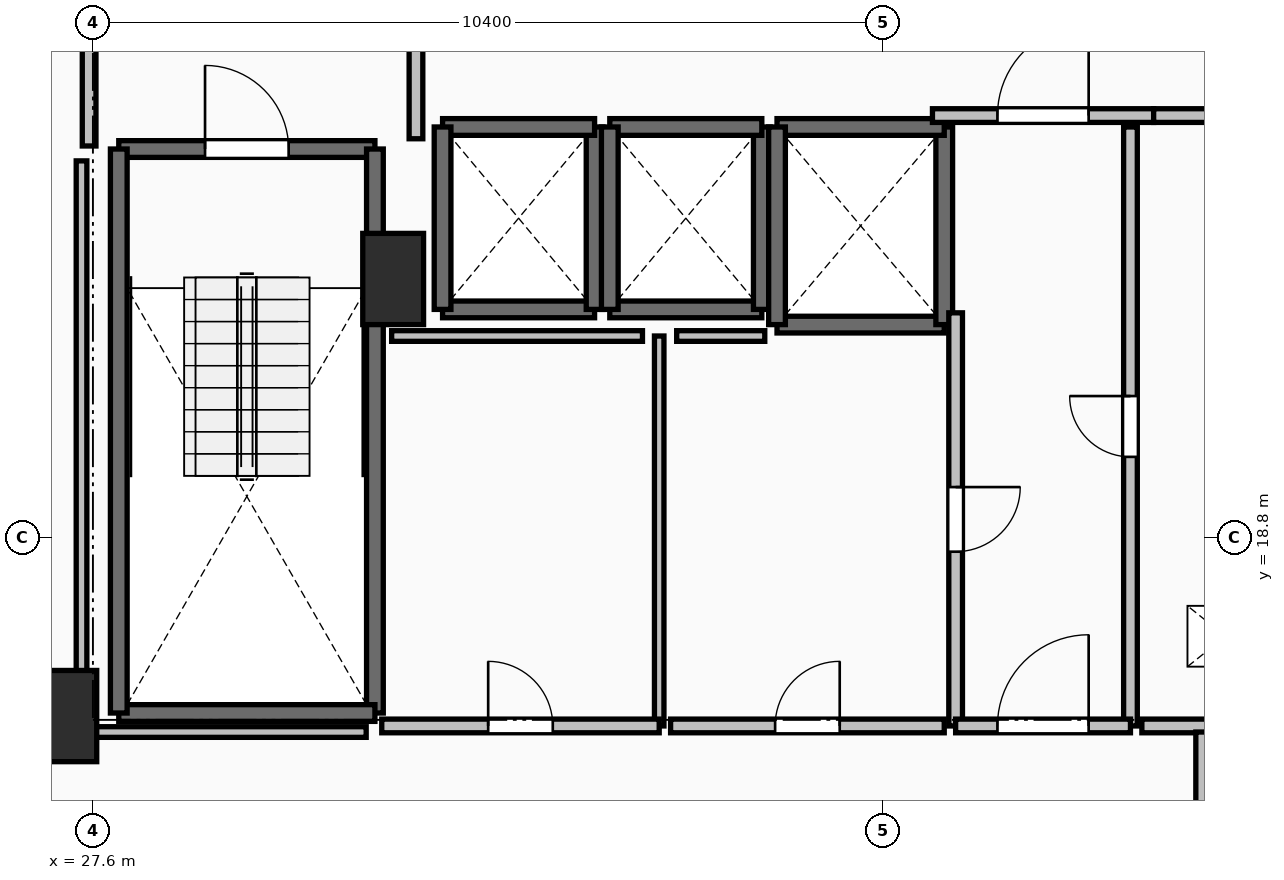
"""IFC4 building model, lengths in metres.
Left out: names, types, materials, properties, quantities, classifications, styles, units other than length and angle.
Written with IfcOpenShell. Run it as: python <this file> out.ifc"""

import sys

from ifc_helpers import new_model, si_unit, direction, frame, frame_2d, origin, origin_2d, place, context, subcontext, project, spatial, rectangle, extrude, element, fill, save


model = new_model("IFC4")
c1 = context("Model", 3, precision=1e-05, world=origin(), true_north=direction((0.0, 1.0)))
c2 = subcontext(c1, "Body", "Model", "MODEL_VIEW")
j1 = project(units=[si_unit("LENGTHUNIT", "METRE"), si_unit("PLANEANGLEUNIT", "RADIAN")], contexts=[c1])
p1 = place(None, origin())
s1 = spatial("IfcSite", under=j1, at=p1, CompositionType="ELEMENT")
p2 = place(p1, origin())
s2 = spatial("IfcBuilding", under=s1, at=p2, CompositionType="ELEMENT")
p3 = place(p2, frame((0.0, 0.0, 59.0)))
s3 = spatial("IfcBuildingStorey", under=s2, at=p3, CompositionType="ELEMENT", Elevation=59.0)
for number, where, z_axis, x_axis in (
    (1, (27.25, 16.45, 0.0), (0.0, 0.0, 1.0), (1.0, 0.0, 0.0)),
    (2, (31.55, 22.2, 0.0), (0.0, 0.0, 1.0), (1.0, 0.0, 0.0)),
):
    element("IfcColumn", number, at=place(p3, frame(where, z_axis=z_axis, x_axis=x_axis)), inside=s3, PredefinedType="PILASTER", context=c2, shape_type="SweptSolid", body=[
        extrude(rectangle(XDim=0.8, YDim=1.2, at=origin_2d()), origin(), (0.0, 0.0, 1.0), 3.5),
    ])
p4 = place(p3, frame((27.94, 23.91, 0.0), z_axis=(0.0, 0.0, 1.0), x_axis=(1.0, 0.0, 0.0)))
e3 = element("IfcWall", 3, at=p4, inside=s3, PredefinedType="SOLIDWALL", context=c2, shape_type="SweptSolid", body=[
    extrude(rectangle(XDim=3.37, YDim=0.22, at=frame_2d((1.685, 0.0))), origin(), (0.0, 0.0, 1.0), 3.24),
])
p5 = place(p4, frame((1.135, 0.0, 0.0)))
e4 = element("IfcOpeningElement", 4, at=p5, cuts=e3, PredefinedType="OPENING", context=c2, shape_type="SweptSolid", body=[
    extrude(rectangle(XDim=1.1, YDim=2.15, at=frame_2d((0.55, 1.075))), frame((0.0, 0.125, 0.0), z_axis=(0.0, -1.0, 0.0), x_axis=(1.0, 0.0, 0.0)), (0.0, 0.0, 1.0), 0.25),
])
p6 = place(p3, frame((31.31, 23.91, 0.0), z_axis=(0.0, 0.0, 1.0), x_axis=(0.0, -1.0, 0.0)))
e5 = element("IfcWall", 5, at=p6, inside=s3, PredefinedType="SOLIDWALL", context=c2, shape_type="SweptSolid", body=[
    extrude(rectangle(XDim=7.42, YDim=0.22, at=frame_2d((3.71, 0.0))), origin(), (0.0, 0.0, 1.0), 3.24),
])
p7 = place(p3, frame((31.31, 16.49, 0.0), z_axis=(0.0, 0.0, 1.0), x_axis=(-1.0, 0.0, 0.0)))
e6 = element("IfcWall", 6, at=p7, inside=s3, PredefinedType="SOLIDWALL", context=c2, shape_type="SweptSolid", body=[
    extrude(rectangle(XDim=3.37, YDim=0.22, at=frame_2d((1.685, 0.0))), origin(), (0.0, 0.0, 1.0), 3.24),
])
p8 = place(p3, frame((27.94, 16.49, 0.0), z_axis=(0.0, 0.0, 1.0), x_axis=(0.0, 1.0, 0.0)))
e7 = element("IfcWall", 7, at=p8, inside=s3, PredefinedType="SOLIDWALL", context=c2, shape_type="SweptSolid", body=[
    extrude(rectangle(XDim=7.42, YDim=0.22, at=frame_2d((3.71, 0.0))), origin(), (0.0, 0.0, 1.0), 3.24),
])
p9 = place(p3, frame((32.2, 21.8, 0.0), z_axis=(0.0, 0.0, 1.0), x_axis=(1.0, 0.0, 0.0)))
e8 = element("IfcWall", 8, at=p9, inside=s3, PredefinedType="SOLIDWALL", context=c2, shape_type="SweptSolid", body=[
    extrude(rectangle(XDim=2.0, YDim=0.22, at=frame_2d((1.0, 0.0))), origin(), (0.0, 0.0, 1.0), 3.24),
])
p10 = place(p3, frame((34.2, 21.8, 0.0), z_axis=(0.0, 0.0, 1.0), x_axis=(0.0, 1.0, 0.0)))
e9 = element("IfcWall", 9, at=p10, inside=s3, PredefinedType="SOLIDWALL", context=c2, shape_type="SweptSolid", body=[
    extrude(rectangle(XDim=2.4, YDim=0.22, at=frame_2d((1.2, 0.0))), origin(), (0.0, 0.0, 1.0), 3.24),
])
p11 = place(p3, frame((34.2, 24.2, 0.0), z_axis=(0.0, 0.0, 1.0), x_axis=(-1.0, 0.0, 0.0)))
e10 = element("IfcWall", 10, at=p11, inside=s3, PredefinedType="SOLIDWALL", context=c2, shape_type="SweptSolid", body=[
    extrude(rectangle(XDim=2.0, YDim=0.22, at=frame_2d((1.0, 0.0))), origin(), (0.0, 0.0, 1.0), 3.24),
])
p12 = place(p3, frame((32.2, 24.2, 0.0), z_axis=(0.0, 0.0, 1.0), x_axis=(0.0, -1.0, 0.0)))
e11 = element("IfcWall", 11, at=p12, inside=s3, PredefinedType="SOLIDWALL", context=c2, shape_type="SweptSolid", body=[
    extrude(rectangle(XDim=2.4, YDim=0.22, at=frame_2d((1.2, 0.0))), origin(), (0.0, 0.0, 1.0), 3.24),
])
p13 = place(p3, frame((34.4, 21.8, 0.0), z_axis=(0.0, 0.0, 1.0), x_axis=(1.0, 0.0, 0.0)))
e12 = element("IfcWall", 12, at=p13, inside=s3, PredefinedType="SOLIDWALL", context=c2, shape_type="SweptSolid", body=[
    extrude(rectangle(XDim=2.0, YDim=0.22, at=frame_2d((1.0, 0.0))), origin(), (0.0, 0.0, 1.0), 3.24),
])
p14 = place(p3, frame((36.4, 21.8, 0.0), z_axis=(0.0, 0.0, 1.0), x_axis=(0.0, 1.0, 0.0)))
e13 = element("IfcWall", 13, at=p14, inside=s3, PredefinedType="SOLIDWALL", context=c2, shape_type="SweptSolid", body=[
    extrude(rectangle(XDim=2.4, YDim=0.22, at=frame_2d((1.2, 0.0))), origin(), (0.0, 0.0, 1.0), 3.24),
])
p15 = place(p3, frame((36.4, 24.2, 0.0), z_axis=(0.0, 0.0, 1.0), x_axis=(-1.0, 0.0, 0.0)))
e14 = element("IfcWall", 14, at=p15, inside=s3, PredefinedType="SOLIDWALL", context=c2, shape_type="SweptSolid", body=[
    extrude(rectangle(XDim=2.0, YDim=0.22, at=frame_2d((1.0, 0.0))), origin(), (0.0, 0.0, 1.0), 3.24),
])
p16 = place(p3, frame((34.4, 24.2, 0.0), z_axis=(0.0, 0.0, 1.0), x_axis=(0.0, -1.0, 0.0)))
e15 = element("IfcWall", 15, at=p16, inside=s3, PredefinedType="SOLIDWALL", context=c2, shape_type="SweptSolid", body=[
    extrude(rectangle(XDim=2.4, YDim=0.22, at=frame_2d((1.2, 0.0))), origin(), (0.0, 0.0, 1.0), 3.24),
])
p17 = place(p3, frame((36.6, 21.6, 0.0), z_axis=(0.0, 0.0, 1.0), x_axis=(1.0, 0.0, 0.0)))
e16 = element("IfcWall", 16, at=p17, inside=s3, PredefinedType="SOLIDWALL", context=c2, shape_type="SweptSolid", body=[
    extrude(rectangle(XDim=2.2, YDim=0.22, at=frame_2d((1.1, 0.0))), origin(), (0.0, 0.0, 1.0), 3.24),
])
p18 = place(p3, frame((38.8, 21.6, 0.0), z_axis=(0.0, 0.0, 1.0), x_axis=(0.0, 1.0, 0.0)))
e17 = element("IfcWall", 17, at=p18, inside=s3, PredefinedType="SOLIDWALL", context=c2, shape_type="SweptSolid", body=[
    extrude(rectangle(XDim=2.6, YDim=0.22, at=frame_2d((1.3, 0.0))), origin(), (0.0, 0.0, 1.0), 3.24),
])
p19 = place(p3, frame((38.8, 24.2, 0.0), z_axis=(0.0, 0.0, 1.0), x_axis=(-1.0, 0.0, 0.0)))
e18 = element("IfcWall", 18, at=p19, inside=s3, PredefinedType="SOLIDWALL", context=c2, shape_type="SweptSolid", body=[
    extrude(rectangle(XDim=2.2, YDim=0.22, at=frame_2d((1.1, 0.0))), origin(), (0.0, 0.0, 1.0), 3.24),
])
p20 = place(p3, frame((36.6, 24.2, 0.0), z_axis=(0.0, 0.0, 1.0), x_axis=(0.0, -1.0, 0.0)))
e19 = element("IfcWall", 19, at=p20, inside=s3, PredefinedType="SOLIDWALL", context=c2, shape_type="SweptSolid", body=[
    extrude(rectangle(XDim=2.6, YDim=0.22, at=frame_2d((1.3, 0.0))), origin(), (0.0, 0.0, 1.0), 3.24),
])
p21 = place(p3, frame((31.85, 24.045, 0.0), z_axis=(0.0, 0.0, 1.0), x_axis=(0.0, 1.0, 0.0)))
e20 = element("IfcWall", 20, at=p21, inside=s3, PredefinedType="PARTITIONING", context=c2, shape_type="SweptSolid", body=[
    extrude(rectangle(XDim=3.91, YDim=0.18, at=frame_2d((1.955, 0.0))), origin(), (0.0, 0.0, 1.0), 3.24),
])
p22 = place(p21, frame((1.355, 0.0, 0.0)))
e21 = element("IfcOpeningElement", 21, at=p22, cuts=e20, PredefinedType="OPENING", context=c2, shape_type="SweptSolid", body=[
    extrude(rectangle(XDim=1.2, YDim=2.15, at=frame_2d((0.6, 1.075))), frame((0.0, 0.105, 0.0), z_axis=(0.0, -1.0, 0.0), x_axis=(1.0, 0.0, 0.0)), (0.0, 0.0, 1.0), 0.21),
])
p23 = place(p3, frame((27.55, 28.0, 0.0), z_axis=(0.0, 0.0, 1.0), x_axis=(0.0, -1.0, 0.0)))
e22 = element("IfcWall", 22, at=p23, inside=s3, PredefinedType="PARTITIONING", context=c2, shape_type="SweptSolid", body=[
    extrude(rectangle(XDim=4.05, YDim=0.18, at=frame_2d((2.025, 0.0))), origin(), (0.0, 0.0, 1.0), 3.24),
])
p24 = place(p23, frame((1.425, 0.0, 0.0)))
e23 = element("IfcOpeningElement", 23, at=p24, cuts=e22, PredefinedType="OPENING", context=c2, shape_type="SweptSolid", body=[
    extrude(rectangle(XDim=1.2, YDim=2.15, at=frame_2d((0.6, 1.075))), frame((0.0, 0.105, 0.0), z_axis=(0.0, -1.0, 0.0), x_axis=(1.0, 0.0, 0.0)), (0.0, 0.0, 1.0), 0.21),
])
p25 = place(p3, frame((38.645, 24.35, 0.0), z_axis=(0.0, 0.0, 1.0), x_axis=(1.0, 0.0, 0.0)))
e24 = element("IfcWall", 24, at=p25, inside=s3, PredefinedType="PARTITIONING", context=c2, shape_type="SweptSolid", body=[
    extrude(rectangle(XDim=2.91, YDim=0.18, at=frame_2d((1.455, 0.0))), origin(), (0.0, 0.0, 1.0), 3.24),
])
p26 = place(p25, frame((0.855, 0.0, 0.0)))
e25 = element("IfcOpeningElement", 25, at=p26, cuts=e24, PredefinedType="OPENING", context=c2, shape_type="SweptSolid", body=[
    extrude(rectangle(XDim=1.2, YDim=2.15, at=frame_2d((0.6, 1.075))), frame((0.0, 0.105, 0.0), z_axis=(0.0, -1.0, 0.0), x_axis=(1.0, 0.0, 0.0)), (0.0, 0.0, 1.0), 0.21),
])
p27 = place(p3, frame((41.555, 24.35, 0.0), z_axis=(0.0, 0.0, 1.0), x_axis=(1.0, 0.0, 0.0)))
e26 = element("IfcWall", 26, at=p27, inside=s3, PredefinedType="PARTITIONING", context=c2, shape_type="SweptSolid", body=[
    extrude(rectangle(XDim=2.445, YDim=0.18, at=frame_2d((1.223, 0.0))), origin(), (0.0, 0.0, 1.0), 3.24),
])
p28 = place(p27, frame((0.823, 0.0, 0.0)))
e27 = element("IfcOpeningElement", 27, at=p28, cuts=e26, PredefinedType="OPENING", context=c2, shape_type="SweptSolid", body=[
    extrude(rectangle(XDim=0.8, YDim=2.05, at=frame_2d((0.4, 1.025))), frame((0.0, 0.105, 0.0), z_axis=(0.0, -1.0, 0.0), x_axis=(1.0, 0.0, 0.0)), (0.0, 0.0, 1.0), 0.21),
])
p29 = place(p3, frame((41.25, 16.32, 0.0), z_axis=(0.0, 0.0, 1.0), x_axis=(0.0, 1.0, 0.0)))
e28 = element("IfcWall", 28, at=p29, inside=s3, PredefinedType="PARTITIONING", context=c2, shape_type="SweptSolid", body=[
    extrude(rectangle(XDim=7.88, YDim=0.18, at=frame_2d((3.94, 0.0))), origin(), (0.0, 0.0, 1.0), 3.24),
])
p30 = place(p29, frame((3.54, 0.0, 0.0)))
e29 = element("IfcOpeningElement", 29, at=p30, cuts=e28, PredefinedType="OPENING", context=c2, shape_type="SweptSolid", body=[
    extrude(rectangle(XDim=0.8, YDim=2.05, at=frame_2d((0.4, 1.025))), frame((0.0, 0.105, 0.0), z_axis=(0.0, -1.0, 0.0), x_axis=(1.0, 0.0, 0.0)), (0.0, 0.0, 1.0), 0.21),
])
p31 = place(p3, frame((38.95, 21.755, 0.0), z_axis=(0.0, 0.0, 1.0), x_axis=(0.0, -1.0, 0.0)))
e30 = element("IfcWall", 30, at=p31, inside=s3, PredefinedType="PARTITIONING", context=c2, shape_type="SweptSolid", body=[
    extrude(rectangle(XDim=5.435, YDim=0.18, at=frame_2d((2.717, 0.0))), origin(), (0.0, 0.0, 1.0), 3.24),
])
p32 = place(p31, frame((2.292, 0.0, 0.0)))
e31 = element("IfcOpeningElement", 31, at=p32, cuts=e30, PredefinedType="OPENING", context=c2, shape_type="SweptSolid", body=[
    extrude(rectangle(XDim=0.85, YDim=2.1, at=frame_2d((0.425, 1.05))), frame((0.0, 0.105, 0.0), z_axis=(0.0, -1.0, 0.0), x_axis=(1.0, 0.0, 0.0)), (0.0, 0.0, 1.0), 0.21),
])
p33 = place(p3, frame((38.95, 16.32, 0.0), z_axis=(0.0, 0.0, 1.0), x_axis=(1.0, 0.0, 0.0)))
e32 = element("IfcWall", 32, at=p33, inside=s3, PredefinedType="PARTITIONING", context=c2, shape_type="SweptSolid", body=[
    extrude(rectangle(XDim=2.3, YDim=0.18, at=frame_2d((1.15, 0.0))), origin(), (0.0, 0.0, 1.0), 3.24),
])
p34 = place(p33, frame((0.55, 0.0, 0.0)))
e33 = element("IfcOpeningElement", 33, at=p34, cuts=e32, PredefinedType="OPENING", context=c2, shape_type="SweptSolid", body=[
    extrude(rectangle(XDim=1.2, YDim=2.15, at=frame_2d((0.6, 1.075))), frame((0.0, 0.105, 0.0), z_axis=(0.0, -1.0, 0.0), x_axis=(1.0, 0.0, 0.0)), (0.0, 0.0, 1.0), 0.21),
])
p35 = place(p3, frame((41.4, 16.32, 0.0), z_axis=(0.0, 0.0, 1.0), x_axis=(1.0, 0.0, 0.0)))
e34 = element("IfcWall", 34, at=p35, inside=s3, PredefinedType="PARTITIONING", context=c2, shape_type="SweptSolid", body=[
    extrude(rectangle(XDim=3.2, YDim=0.18, at=frame_2d((1.6, 0.0))), origin(), (0.0, 0.0, 1.0), 3.24),
])
p36 = place(p35, frame((1.2, 0.0, 0.0)))
e35 = element("IfcOpeningElement", 35, at=p36, cuts=e34, PredefinedType="OPENING", context=c2, shape_type="SweptSolid", body=[
    extrude(rectangle(XDim=0.8, YDim=2.05, at=frame_2d((0.4, 1.025))), frame((0.0, 0.105, 0.0), z_axis=(0.0, -1.0, 0.0), x_axis=(1.0, 0.0, 0.0)), (0.0, 0.0, 1.0), 0.21),
])
p37 = place(p3, frame((35.05, 16.32, 0.0), z_axis=(0.0, 0.0, 1.0), x_axis=(0.0, 1.0, 0.0)))
e36 = element("IfcWall", 36, at=p37, inside=s3, PredefinedType="PARTITIONING", context=c2, shape_type="SweptSolid", body=[
    extrude(rectangle(XDim=5.13, YDim=0.125, at=frame_2d((2.565, 0.0))), origin(), (0.0, 0.0, 1.0), 3.24),
])
p38 = place(p3, frame((31.4, 16.32, 0.0), z_axis=(0.0, 0.0, 1.0), x_axis=(1.0, 0.0, 0.0)))
e37 = element("IfcWall", 37, at=p38, inside=s3, PredefinedType="PARTITIONING", context=c2, shape_type="SweptSolid", body=[
    extrude(rectangle(XDim=3.65, YDim=0.18, at=frame_2d((1.825, 0.0))), origin(), (0.0, 0.0, 1.0), 3.24),
])
p39 = place(p38, frame((1.4, 0.0, 0.0)))
e38 = element("IfcOpeningElement", 38, at=p39, cuts=e37, PredefinedType="OPENING", context=c2, shape_type="SweptSolid", body=[
    extrude(rectangle(XDim=0.85, YDim=2.1, at=frame_2d((0.425, 1.05))), frame((0.0, 0.105, 0.0), z_axis=(0.0, -1.0, 0.0), x_axis=(1.0, 0.0, 0.0)), (0.0, 0.0, 1.0), 0.21),
])
p40 = place(p3, frame((35.2, 16.32, 0.0), z_axis=(0.0, 0.0, 1.0), x_axis=(1.0, 0.0, 0.0)))
e39 = element("IfcWall", 39, at=p40, inside=s3, PredefinedType="PARTITIONING", context=c2, shape_type="SweptSolid", body=[
    extrude(rectangle(XDim=3.6, YDim=0.18, at=frame_2d((1.8, 0.0))), origin(), (0.0, 0.0, 1.0), 3.24),
])
p41 = place(p40, frame((1.375, 0.0, 0.0)))
e40 = element("IfcOpeningElement", 40, at=p41, cuts=e39, PredefinedType="OPENING", context=c2, shape_type="SweptSolid", body=[
    extrude(rectangle(XDim=0.85, YDim=2.1, at=frame_2d((0.425, 1.05))), frame((0.0, 0.105, 0.0), z_axis=(0.0, -1.0, 0.0), x_axis=(1.0, 0.0, 0.0)), (0.0, 0.0, 1.0), 0.21),
])
p42 = place(p3, frame((42.2, 14.1, 0.0), z_axis=(0.0, 0.0, 1.0), x_axis=(0.0, 1.0, 0.0)))
e41 = element("IfcWall", 41, at=p42, inside=s3, PredefinedType="PARTITIONING", context=c2, shape_type="SweptSolid", body=[
    extrude(rectangle(XDim=2.14, YDim=0.18, at=frame_2d((1.07, 0.0))), origin(), (0.0, 0.0, 1.0), 3.24),
])
p43 = place(p3, frame((34.83, 21.45, 0.0), z_axis=(0.0, 0.0, 1.0), x_axis=(-1.0, 0.0, 0.0)))
e42 = element("IfcWall", 42, at=p43, inside=s3, PredefinedType="PARTITIONING", context=c2, shape_type="SweptSolid", body=[
    extrude(rectangle(XDim=3.3, YDim=0.14, at=frame_2d((1.65, 0.0))), origin(), (0.0, 0.0, 1.0), 3.24),
])
p44 = place(p3, frame((36.439, 21.45, 0.0), z_axis=(0.0, 0.0, 1.0), x_axis=(-1.0, 0.0, 0.0)))
e43 = element("IfcWall", 43, at=p44, inside=s3, PredefinedType="PARTITIONING", context=c2, shape_type="SweptSolid", body=[
    extrude(rectangle(XDim=1.159, YDim=0.14, at=frame_2d((0.58, 0.0))), origin(), (0.0, 0.0, 1.0), 3.24),
])
p45 = place(p3, frame((31.195, 16.24, 0.0), z_axis=(0.0, 0.0, 1.0), x_axis=(-1.0, 0.0, 0.0)))
e44 = element("IfcWall", 44, at=p45, inside=s3, PredefinedType="PARTITIONING", context=c2, shape_type="SweptSolid", body=[
    extrude(rectangle(XDim=3.745, YDim=0.14, at=frame_2d((1.873, 0.0))), origin(), (0.0, 0.0, 1.0), 2.432),
])
p46 = place(p3, frame((27.45, 16.24, 0.0), z_axis=(0.0, 0.0, 1.0), x_axis=(0.0, 1.0, 0.0)))
e45 = element("IfcWall", 45, at=p46, inside=s3, PredefinedType="PARTITIONING", context=c2, shape_type="SweptSolid", body=[
    extrude(rectangle(XDim=7.514, YDim=0.14, at=frame_2d((3.757, 0.0))), origin(), (0.0, 0.0, 1.0), 2.432),
])
p47 = place(p5, origin())
e46 = element("IfcDoor", 46, at=p47, inside=s3, OperationType="SINGLE_SWING_LEFT", PredefinedType="DOOR", context=c2, shape_type="SweptSolid", body=[
    extrude(rectangle(XDim=1.1, YDim=2.15, at=frame_2d((0.55, 1.075))), frame((0.0, 0.025, 0.0), z_axis=(0.0, -1.0, 0.0), x_axis=(1.0, 0.0, 0.0)), (0.0, 0.0, 1.0), 0.05),
])
fill(e4, e46)
p48 = place(p26, origin())
e47 = element("IfcDoor", 47, at=p48, inside=s3, OperationType="SINGLE_SWING_RIGHT", PredefinedType="DOOR", context=c2, shape_type="SweptSolid", body=[
    extrude(rectangle(XDim=1.2, YDim=2.15, at=frame_2d((0.6, 1.075))), frame((0.0, 0.025, 0.0), z_axis=(0.0, -1.0, 0.0), x_axis=(1.0, 0.0, 0.0)), (0.0, 0.0, 1.0), 0.05),
])
fill(e25, e47)
p49 = place(p30, origin())
e48 = element("IfcDoor", 48, at=p49, inside=s3, OperationType="SINGLE_SWING_RIGHT", PredefinedType="DOOR", context=c2, shape_type="SweptSolid", body=[
    extrude(rectangle(XDim=0.8, YDim=2.05, at=frame_2d((0.4, 1.025))), frame((0.0, 0.025, 0.0), z_axis=(0.0, -1.0, 0.0), x_axis=(1.0, 0.0, 0.0)), (0.0, 0.0, 1.0), 0.05),
])
fill(e29, e48)
p50 = place(p32, origin())
e49 = element("IfcDoor", 49, at=p50, inside=s3, OperationType="SINGLE_SWING_LEFT", PredefinedType="DOOR", context=c2, shape_type="SweptSolid", body=[
    extrude(rectangle(XDim=0.85, YDim=2.1, at=frame_2d((0.425, 1.05))), frame((0.0, 0.025, 0.0), z_axis=(0.0, -1.0, 0.0), x_axis=(1.0, 0.0, 0.0)), (0.0, 0.0, 1.0), 0.05),
])
fill(e31, e49)
p51 = place(p34, origin())
e50 = element("IfcDoor", 50, at=p51, inside=s3, OperationType="SINGLE_SWING_RIGHT", PredefinedType="DOOR", context=c2, shape_type="SweptSolid", body=[
    extrude(rectangle(XDim=1.2, YDim=2.15, at=frame_2d((0.6, 1.075))), frame((0.0, 0.025, 0.0), z_axis=(0.0, -1.0, 0.0), x_axis=(1.0, 0.0, 0.0)), (0.0, 0.0, 1.0), 0.05),
])
fill(e33, e50)
p52 = place(p39, origin())
e51 = element("IfcDoor", 51, at=p52, inside=s3, OperationType="SINGLE_SWING_LEFT", PredefinedType="DOOR", context=c2, shape_type="SweptSolid", body=[
    extrude(rectangle(XDim=0.85, YDim=2.1, at=frame_2d((0.425, 1.05))), frame((0.0, 0.025, 0.0), z_axis=(0.0, -1.0, 0.0), x_axis=(1.0, 0.0, 0.0)), (0.0, 0.0, 1.0), 0.05),
])
fill(e38, e51)
p53 = place(p41, origin())
e52 = element("IfcDoor", 52, at=p53, inside=s3, OperationType="SINGLE_SWING_RIGHT", PredefinedType="DOOR", context=c2, shape_type="SweptSolid", body=[
    extrude(rectangle(XDim=0.85, YDim=2.1, at=frame_2d((0.425, 1.05))), frame((0.0, 0.025, 0.0), z_axis=(0.0, -1.0, 0.0), x_axis=(1.0, 0.0, 0.0)), (0.0, 0.0, 1.0), 0.05),
])
fill(e40, e52)
save(model, sys.argv[1])
